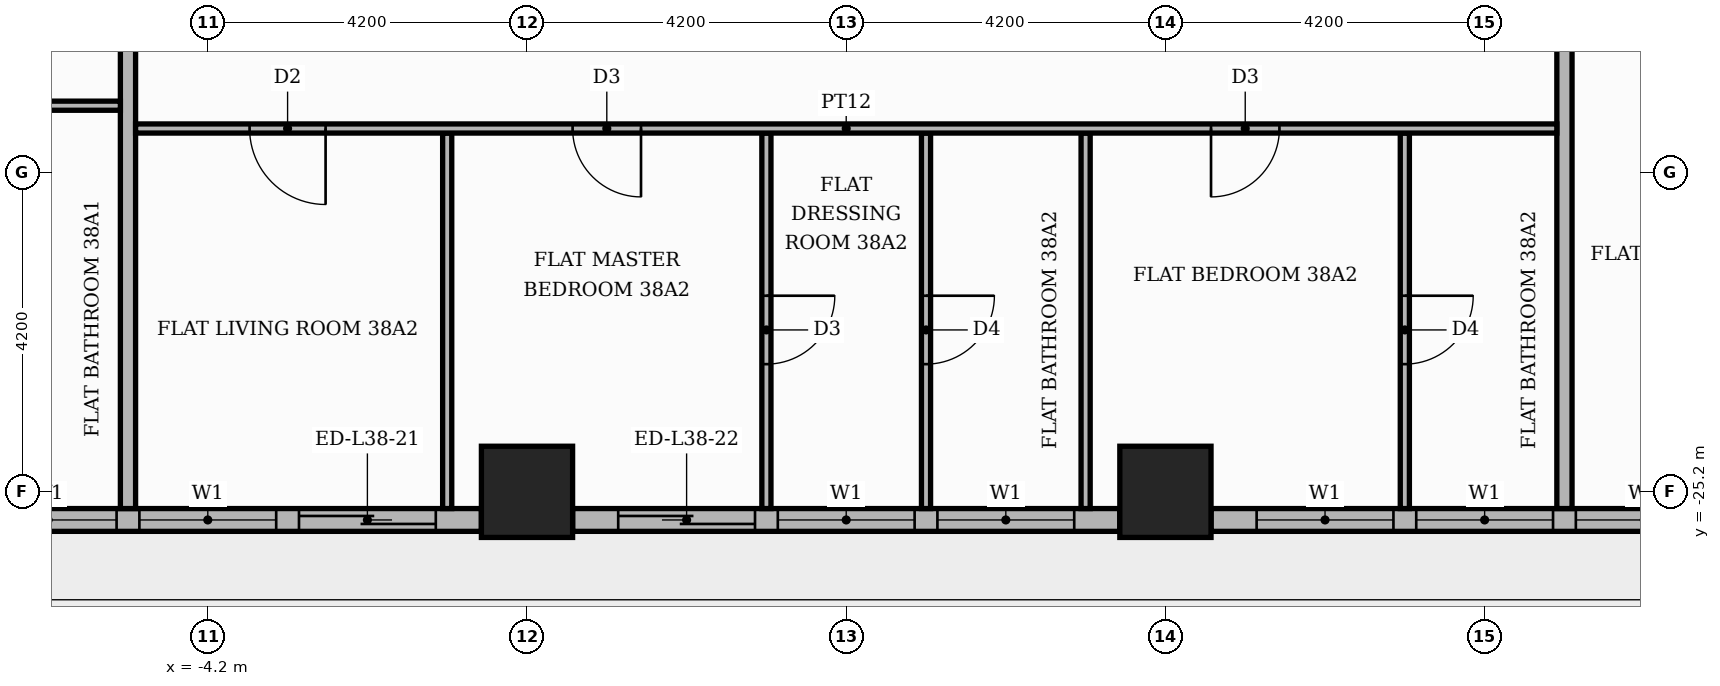
"""IFC4 building model, lengths in metres.
Left out: names, types, materials, properties, quantities, classifications, styles, units other than length and angle.
Written with IfcOpenShell. Run it as: python <this file> out.ifc"""

import sys

from ifc_helpers import new_model, si_unit, direction, frame, frame_2d, origin, origin_2d, place, context, subcontext, project, spatial, rectangle, extrude, element, fill, save


model = new_model("IFC4")
c1 = context("Model", 3, precision=1e-05, world=origin(), true_north=direction((0.0, 1.0)))
c2 = subcontext(c1, "Body", "Model", "MODEL_VIEW")
j1 = project(units=[si_unit("LENGTHUNIT", "METRE"), si_unit("PLANEANGLEUNIT", "RADIAN")], contexts=[c1])
p1 = place(None, origin())
s1 = spatial("IfcSite", under=j1, at=p1, CompositionType="ELEMENT")
p2 = place(p1, origin())
s2 = spatial("IfcBuilding", under=s1, at=p2, CompositionType="ELEMENT")
p3 = place(p2, frame((0.0, 0.0, 161.1)))
s3 = spatial("IfcBuildingStorey", under=s2, at=p3, CompositionType="ELEMENT", Elevation=161.1)
for number, where, z_axis, x_axis in (
    (1, (0.0, -25.2, 0.0), (0.0, 0.0, 1.0), (1.0, 0.0, 0.0)),
    (2, (8.4, -25.2, 0.0), (0.0, 0.0, 1.0), (1.0, 0.0, 0.0)),
):
    element("IfcColumn", number, at=place(p3, frame(where, z_axis=z_axis, x_axis=x_axis)), inside=s3, PredefinedType="COLUMN", context=c2, shape_type="SweptSolid", body=[
        extrude(rectangle(XDim=1.2, YDim=1.2, at=origin_2d()), origin(), (0.0, 0.0, 1.0), 3.9),
    ])
p4 = place(p3, frame((-7.8, -25.57, 0.0), z_axis=(0.0, 0.0, 1.0), x_axis=(1.0, 0.0, 0.0)))
e3 = element("IfcWall", 3, at=p4, inside=s3, PredefinedType="STANDARD", context=c2, shape_type="SweptSolid", body=[
    extrude(rectangle(XDim=7.2, YDim=0.3, at=frame_2d((3.6, 0.0))), origin(), (0.0, 0.0, 1.0), 3.48),
])
p5 = place(p4, frame((0.6, 0.0, 0.9)))
e4 = element("IfcOpeningElement", 4, at=p5, cuts=e3, PredefinedType="OPENING", context=c2, shape_type="SweptSolid", body=[
    extrude(rectangle(XDim=1.8, YDim=2.1, at=frame_2d((0.9, 1.05))), frame((0.0, 0.16, 0.0), z_axis=(0.0, -1.0, 0.0), x_axis=(1.0, 0.0, 0.0)), (0.0, 0.0, 1.0), 0.32),
])
p6 = place(p4, frame((2.7, 0.0, 0.9)))
e5 = element("IfcOpeningElement", 5, at=p6, cuts=e3, PredefinedType="OPENING", context=c2, shape_type="SweptSolid", body=[
    extrude(rectangle(XDim=1.8, YDim=2.1, at=frame_2d((0.9, 1.05))), frame((0.0, 0.16, 0.0), z_axis=(0.0, -1.0, 0.0), x_axis=(1.0, 0.0, 0.0)), (0.0, 0.0, 1.0), 0.32),
])
p7 = place(p4, frame((4.8, 0.0, 0.0)))
e6 = element("IfcOpeningElement", 6, at=p7, cuts=e3, PredefinedType="OPENING", context=c2, shape_type="SweptSolid", body=[
    extrude(rectangle(XDim=1.8, YDim=2.4, at=frame_2d((0.9, 1.2))), frame((0.0, 0.16, 0.0), z_axis=(0.0, -1.0, 0.0), x_axis=(1.0, 0.0, 0.0)), (0.0, 0.0, 1.0), 0.32),
])
p8 = place(p3, frame((0.6, -25.57, 0.0), z_axis=(0.0, 0.0, 1.0), x_axis=(1.0, 0.0, 0.0)))
e7 = element("IfcWall", 7, at=p8, inside=s3, PredefinedType="STANDARD", context=c2, shape_type="SweptSolid", body=[
    extrude(rectangle(XDim=7.2, YDim=0.3, at=frame_2d((3.6, 0.0))), origin(), (0.0, 0.0, 1.0), 3.48),
])
p9 = place(p8, frame((0.6, 0.0, 0.0)))
e8 = element("IfcOpeningElement", 8, at=p9, cuts=e7, PredefinedType="OPENING", context=c2, shape_type="SweptSolid", body=[
    extrude(rectangle(XDim=1.8, YDim=2.4, at=frame_2d((0.9, 1.2))), frame((0.0, 0.16, 0.0), z_axis=(0.0, -1.0, 0.0), x_axis=(1.0, 0.0, 0.0)), (0.0, 0.0, 1.0), 0.32),
])
p10 = place(p8, frame((2.7, 0.0, 0.9)))
e9 = element("IfcOpeningElement", 9, at=p10, cuts=e7, PredefinedType="OPENING", context=c2, shape_type="SweptSolid", body=[
    extrude(rectangle(XDim=1.8, YDim=2.1, at=frame_2d((0.9, 1.05))), frame((0.0, 0.16, 0.0), z_axis=(0.0, -1.0, 0.0), x_axis=(1.0, 0.0, 0.0)), (0.0, 0.0, 1.0), 0.32),
])
p11 = place(p8, frame((4.8, 0.0, 0.9)))
e10 = element("IfcOpeningElement", 10, at=p11, cuts=e7, PredefinedType="OPENING", context=c2, shape_type="SweptSolid", body=[
    extrude(rectangle(XDim=1.8, YDim=2.1, at=frame_2d((0.9, 1.05))), frame((0.0, 0.16, 0.0), z_axis=(0.0, -1.0, 0.0), x_axis=(1.0, 0.0, 0.0)), (0.0, 0.0, 1.0), 0.32),
])
p12 = place(p3, frame((9.0, -25.57, 0.0), z_axis=(0.0, 0.0, 1.0), x_axis=(1.0, 0.0, 0.0)))
e11 = element("IfcWall", 11, at=p12, inside=s3, PredefinedType="STANDARD", context=c2, shape_type="SweptSolid", body=[
    extrude(rectangle(XDim=7.2, YDim=0.3, at=frame_2d((3.6, 0.0))), origin(), (0.0, 0.0, 1.0), 3.48),
])
p13 = place(p12, frame((0.6, 0.0, 0.9)))
e12 = element("IfcOpeningElement", 12, at=p13, cuts=e11, PredefinedType="OPENING", context=c2, shape_type="SweptSolid", body=[
    extrude(rectangle(XDim=1.8, YDim=2.1, at=frame_2d((0.9, 1.05))), frame((0.0, 0.16, 0.0), z_axis=(0.0, -1.0, 0.0), x_axis=(1.0, 0.0, 0.0)), (0.0, 0.0, 1.0), 0.32),
])
p14 = place(p12, frame((2.7, 0.0, 0.9)))
e13 = element("IfcOpeningElement", 13, at=p14, cuts=e11, PredefinedType="OPENING", context=c2, shape_type="SweptSolid", body=[
    extrude(rectangle(XDim=1.8, YDim=2.1, at=frame_2d((0.9, 1.05))), frame((0.0, 0.16, 0.0), z_axis=(0.0, -1.0, 0.0), x_axis=(1.0, 0.0, 0.0)), (0.0, 0.0, 1.0), 0.32),
])
p15 = place(p12, frame((4.8, 0.0, 0.9)))
e14 = element("IfcOpeningElement", 14, at=p15, cuts=e11, PredefinedType="OPENING", context=c2, shape_type="SweptSolid", body=[
    extrude(rectangle(XDim=1.8, YDim=2.1, at=frame_2d((0.9, 1.05))), frame((0.0, 0.16, 0.0), z_axis=(0.0, -1.0, 0.0), x_axis=(1.0, 0.0, 0.0)), (0.0, 0.0, 1.0), 0.32),
])
p16 = place(p3, frame((-5.25, -25.42, 0.0), z_axis=(0.0, 0.0, 1.0), x_axis=(0.0, 1.0, 0.0)))
e15 = element("IfcWall", 15, at=p16, inside=s3, PredefinedType="PARTITIONING", context=c2, shape_type="SweptSolid", body=[
    extrude(rectangle(XDim=11.67, YDim=0.2, at=frame_2d((5.835, 0.0))), origin(), (0.0, 0.0, 1.0), 3.48),
])
p17 = place(p3, frame((-1.05, -25.42, 0.0), z_axis=(0.0, 0.0, 1.0), x_axis=(0.0, 1.0, 0.0)))
e16 = element("IfcWall", 16, at=p17, inside=s3, PredefinedType="PARTITIONING", context=c2, shape_type="SweptSolid", body=[
    extrude(rectangle(XDim=4.94, YDim=0.12, at=frame_2d((2.47, 0.0))), origin(), (0.0, 0.0, 1.0), 3.48),
])
p18 = place(p3, frame((3.15, -25.42, 0.0), z_axis=(0.0, 0.0, 1.0), x_axis=(0.0, 1.0, 0.0)))
e17 = element("IfcWall", 17, at=p18, inside=s3, PredefinedType="PARTITIONING", context=c2, shape_type="SweptSolid", body=[
    extrude(rectangle(XDim=4.94, YDim=0.12, at=frame_2d((2.47, 0.0))), origin(), (0.0, 0.0, 1.0), 3.48),
])
p19 = place(p18, frame((1.9, 0.0, 0.0)))
e18 = element("IfcOpeningElement", 18, at=p19, cuts=e17, PredefinedType="OPENING", context=c2, shape_type="SweptSolid", body=[
    extrude(rectangle(XDim=0.9, YDim=2.1, at=frame_2d((0.45, 1.05))), frame((0.0, 0.07, 0.0), z_axis=(0.0, -1.0, 0.0), x_axis=(1.0, 0.0, 0.0)), (0.0, 0.0, 1.0), 0.14),
])
p20 = place(p3, frame((5.25, -25.42, 0.0), z_axis=(0.0, 0.0, 1.0), x_axis=(0.0, 1.0, 0.0)))
e19 = element("IfcWall", 19, at=p20, inside=s3, PredefinedType="PARTITIONING", context=c2, shape_type="SweptSolid", body=[
    extrude(rectangle(XDim=4.94, YDim=0.12, at=frame_2d((2.47, 0.0))), origin(), (0.0, 0.0, 1.0), 3.48),
])
p21 = place(p20, frame((1.9, 0.0, 0.0)))
e20 = element("IfcOpeningElement", 20, at=p21, cuts=e19, PredefinedType="OPENING", context=c2, shape_type="SweptSolid", body=[
    extrude(rectangle(XDim=0.9, YDim=2.1, at=frame_2d((0.45, 1.05))), frame((0.0, 0.07, 0.0), z_axis=(0.0, -1.0, 0.0), x_axis=(1.0, 0.0, 0.0)), (0.0, 0.0, 1.0), 0.14),
])
p22 = place(p3, frame((7.35, -25.42, 0.0), z_axis=(0.0, 0.0, 1.0), x_axis=(0.0, 1.0, 0.0)))
e21 = element("IfcWall", 21, at=p22, inside=s3, PredefinedType="PARTITIONING", context=c2, shape_type="SweptSolid", body=[
    extrude(rectangle(XDim=4.94, YDim=0.12, at=frame_2d((2.47, 0.0))), origin(), (0.0, 0.0, 1.0), 3.48),
])
p23 = place(p3, frame((11.55, -25.42, 0.0), z_axis=(0.0, 0.0, 1.0), x_axis=(0.0, 1.0, 0.0)))
e22 = element("IfcWall", 22, at=p23, inside=s3, PredefinedType="PARTITIONING", context=c2, shape_type="SweptSolid", body=[
    extrude(rectangle(XDim=4.94, YDim=0.12, at=frame_2d((2.47, 0.0))), origin(), (0.0, 0.0, 1.0), 3.48),
])
p24 = place(p23, frame((1.9, 0.0, 0.0)))
e23 = element("IfcOpeningElement", 23, at=p24, cuts=e22, PredefinedType="OPENING", context=c2, shape_type="SweptSolid", body=[
    extrude(rectangle(XDim=0.9, YDim=2.1, at=frame_2d((0.45, 1.05))), frame((0.0, 0.07, 0.0), z_axis=(0.0, -1.0, 0.0), x_axis=(1.0, 0.0, 0.0)), (0.0, 0.0, 1.0), 0.14),
])
p25 = place(p3, frame((13.65, -25.42, 0.0), z_axis=(0.0, 0.0, 1.0), x_axis=(0.0, 1.0, 0.0)))
e24 = element("IfcWall", 24, at=p25, inside=s3, PredefinedType="PARTITIONING", context=c2, shape_type="SweptSolid", body=[
    extrude(rectangle(XDim=11.67, YDim=0.2, at=frame_2d((5.835, 0.0))), origin(), (0.0, 0.0, 1.0), 3.48),
])
p26 = place(p3, frame((-5.15, -20.42, 0.0), z_axis=(0.0, 0.0, 1.0), x_axis=(1.0, 0.0, 0.0)))
e25 = element("IfcWall", 25, at=p26, inside=s3, PredefinedType="PARTITIONING", context=c2, shape_type="SweptSolid", body=[
    extrude(rectangle(XDim=18.7, YDim=0.12, at=frame_2d((9.35, 0.0))), origin(), (0.0, 0.0, 1.0), 3.48),
])
p27 = place(p26, frame((1.5, 0.0, 0.0)))
e26 = element("IfcOpeningElement", 26, at=p27, cuts=e25, PredefinedType="OPENING", context=c2, shape_type="SweptSolid", body=[
    extrude(rectangle(XDim=1.0, YDim=2.1, at=frame_2d((0.5, 1.05))), frame((0.0, 0.07, 0.0), z_axis=(0.0, -1.0, 0.0), x_axis=(1.0, 0.0, 0.0)), (0.0, 0.0, 1.0), 0.14),
])
p28 = place(p26, frame((5.75, 0.0, 0.0)))
e27 = element("IfcOpeningElement", 27, at=p28, cuts=e25, PredefinedType="OPENING", context=c2, shape_type="SweptSolid", body=[
    extrude(rectangle(XDim=0.9, YDim=2.1, at=frame_2d((0.45, 1.05))), frame((0.0, 0.07, 0.0), z_axis=(0.0, -1.0, 0.0), x_axis=(1.0, 0.0, 0.0)), (0.0, 0.0, 1.0), 0.14),
])
p29 = place(p26, frame((14.15, 0.0, 0.0)))
e28 = element("IfcOpeningElement", 28, at=p29, cuts=e25, PredefinedType="OPENING", context=c2, shape_type="SweptSolid", body=[
    extrude(rectangle(XDim=0.9, YDim=2.1, at=frame_2d((0.45, 1.05))), frame((0.0, 0.07, 0.0), z_axis=(0.0, -1.0, 0.0), x_axis=(1.0, 0.0, 0.0)), (0.0, 0.0, 1.0), 0.14),
])
p30 = place(p3, frame((-25.42, -20.12, 0.0), z_axis=(0.0, 0.0, 1.0), x_axis=(1.0, 0.0, 0.0)))
e29 = element("IfcWall", 29, at=p30, inside=s3, PredefinedType="PARTITIONING", context=c2, shape_type="SweptSolid", body=[
    extrude(rectangle(XDim=20.07, YDim=0.12, at=frame_2d((10.035, 0.0))), origin(), (0.0, 0.0, 1.0), 3.48),
])
p31 = place(p30, frame((10.22, 0.0, 0.0)))
e30 = element("IfcOpeningElement", 30, at=p31, cuts=e29, PredefinedType="OPENING", context=c2, shape_type="SweptSolid", body=[
    extrude(rectangle(XDim=1.0, YDim=2.1, at=frame_2d((0.5, 1.05))), frame((0.0, 0.07, 0.0), z_axis=(0.0, -1.0, 0.0), x_axis=(1.0, 0.0, 0.0)), (0.0, 0.0, 1.0), 0.14),
])
p32 = place(p30, frame((13.42, 0.0, 0.0)))
e31 = element("IfcOpeningElement", 31, at=p32, cuts=e29, PredefinedType="OPENING", context=c2, shape_type="SweptSolid", body=[
    extrude(rectangle(XDim=0.9, YDim=2.1, at=frame_2d((0.45, 1.05))), frame((0.0, 0.07, 0.0), z_axis=(0.0, -1.0, 0.0), x_axis=(1.0, 0.0, 0.0)), (0.0, 0.0, 1.0), 0.14),
])
p33 = place(p5, origin())
e32 = element("IfcWindow", 32, at=p33, inside=s3, PartitioningType="SINGLE_PANEL", PredefinedType="WINDOW", context=c2, shape_type="SweptSolid", body=[
    extrude(rectangle(XDim=1.8, YDim=2.1, at=frame_2d((0.9, 1.05))), frame((0.0, 0.03, 0.0), z_axis=(0.0, -1.0, 0.0), x_axis=(1.0, 0.0, 0.0)), (0.0, 0.0, 1.0), 0.06),
])
fill(e4, e32)
p34 = place(p6, origin())
e33 = element("IfcWindow", 33, at=p34, inside=s3, PartitioningType="SINGLE_PANEL", PredefinedType="WINDOW", context=c2, shape_type="SweptSolid", body=[
    extrude(rectangle(XDim=1.8, YDim=2.1, at=frame_2d((0.9, 1.05))), frame((0.0, 0.03, 0.0), z_axis=(0.0, -1.0, 0.0), x_axis=(1.0, 0.0, 0.0)), (0.0, 0.0, 1.0), 0.06),
])
fill(e5, e33)
p35 = place(p7, origin())
e34 = element("IfcDoor", 34, at=p35, inside=s3, OperationType="SLIDING_TO_RIGHT", PredefinedType="DOOR", context=c2, shape_type="SweptSolid", body=[
    extrude(rectangle(XDim=1.8, YDim=2.4, at=frame_2d((0.9, 1.2))), frame((0.0, 0.025, 0.0), z_axis=(0.0, -1.0, 0.0), x_axis=(1.0, 0.0, 0.0)), (0.0, 0.0, 1.0), 0.05),
])
fill(e6, e34)
p36 = place(p9, origin())
e35 = element("IfcDoor", 35, at=p36, inside=s3, OperationType="SLIDING_TO_LEFT", PredefinedType="DOOR", context=c2, shape_type="SweptSolid", body=[
    extrude(rectangle(XDim=1.8, YDim=2.4, at=frame_2d((0.9, 1.2))), frame((0.0, 0.025, 0.0), z_axis=(0.0, -1.0, 0.0), x_axis=(1.0, 0.0, 0.0)), (0.0, 0.0, 1.0), 0.05),
])
fill(e8, e35)
p37 = place(p10, origin())
e36 = element("IfcWindow", 36, at=p37, inside=s3, PartitioningType="SINGLE_PANEL", PredefinedType="WINDOW", context=c2, shape_type="SweptSolid", body=[
    extrude(rectangle(XDim=1.8, YDim=2.1, at=frame_2d((0.9, 1.05))), frame((0.0, 0.03, 0.0), z_axis=(0.0, -1.0, 0.0), x_axis=(1.0, 0.0, 0.0)), (0.0, 0.0, 1.0), 0.06),
])
fill(e9, e36)
p38 = place(p11, origin())
e37 = element("IfcWindow", 37, at=p38, inside=s3, PartitioningType="SINGLE_PANEL", PredefinedType="WINDOW", context=c2, shape_type="SweptSolid", body=[
    extrude(rectangle(XDim=1.8, YDim=2.1, at=frame_2d((0.9, 1.05))), frame((0.0, 0.03, 0.0), z_axis=(0.0, -1.0, 0.0), x_axis=(1.0, 0.0, 0.0)), (0.0, 0.0, 1.0), 0.06),
])
fill(e10, e37)
p39 = place(p13, origin())
e38 = element("IfcWindow", 38, at=p39, inside=s3, PartitioningType="SINGLE_PANEL", PredefinedType="WINDOW", context=c2, shape_type="SweptSolid", body=[
    extrude(rectangle(XDim=1.8, YDim=2.1, at=frame_2d((0.9, 1.05))), frame((0.0, 0.03, 0.0), z_axis=(0.0, -1.0, 0.0), x_axis=(1.0, 0.0, 0.0)), (0.0, 0.0, 1.0), 0.06),
])
fill(e12, e38)
p40 = place(p14, origin())
e39 = element("IfcWindow", 39, at=p40, inside=s3, PartitioningType="SINGLE_PANEL", PredefinedType="WINDOW", context=c2, shape_type="SweptSolid", body=[
    extrude(rectangle(XDim=1.8, YDim=2.1, at=frame_2d((0.9, 1.05))), frame((0.0, 0.03, 0.0), z_axis=(0.0, -1.0, 0.0), x_axis=(1.0, 0.0, 0.0)), (0.0, 0.0, 1.0), 0.06),
])
fill(e13, e39)
p41 = place(p15, origin())
e40 = element("IfcWindow", 40, at=p41, inside=s3, PartitioningType="SINGLE_PANEL", PredefinedType="WINDOW", context=c2, shape_type="SweptSolid", body=[
    extrude(rectangle(XDim=1.8, YDim=2.1, at=frame_2d((0.9, 1.05))), frame((0.0, 0.03, 0.0), z_axis=(0.0, -1.0, 0.0), x_axis=(1.0, 0.0, 0.0)), (0.0, 0.0, 1.0), 0.06),
])
fill(e14, e40)
p42 = place(p27, frame((1.0, 0.0, 0.0), z_axis=(0.0, 0.0, 1.0), x_axis=(-1.0, 0.0, 0.0)))
e41 = element("IfcDoor", 41, at=p42, inside=s3, OperationType="SINGLE_SWING_RIGHT", PredefinedType="DOOR", context=c2, shape_type="SweptSolid", body=[
    extrude(rectangle(XDim=1.0, YDim=2.1, at=frame_2d((0.5, 1.05))), frame((0.0, 0.025, 0.0), z_axis=(0.0, -1.0, 0.0), x_axis=(1.0, 0.0, 0.0)), (0.0, 0.0, 1.0), 0.05),
])
fill(e26, e41)
p43 = place(p28, frame((0.9, 0.0, 0.0), z_axis=(0.0, 0.0, 1.0), x_axis=(-1.0, 0.0, 0.0)))
e42 = element("IfcDoor", 42, at=p43, inside=s3, OperationType="SINGLE_SWING_RIGHT", PredefinedType="DOOR", context=c2, shape_type="SweptSolid", body=[
    extrude(rectangle(XDim=0.9, YDim=2.1, at=frame_2d((0.45, 1.05))), frame((0.0, 0.025, 0.0), z_axis=(0.0, -1.0, 0.0), x_axis=(1.0, 0.0, 0.0)), (0.0, 0.0, 1.0), 0.05),
])
fill(e27, e42)
p44 = place(p19, frame((0.9, 0.0, 0.0), z_axis=(0.0, 0.0, 1.0), x_axis=(-1.0, 0.0, 0.0)))
e43 = element("IfcDoor", 43, at=p44, inside=s3, OperationType="SINGLE_SWING_RIGHT", PredefinedType="DOOR", context=c2, shape_type="SweptSolid", body=[
    extrude(rectangle(XDim=0.9, YDim=2.1, at=frame_2d((0.45, 1.05))), frame((0.0, 0.025, 0.0), z_axis=(0.0, -1.0, 0.0), x_axis=(1.0, 0.0, 0.0)), (0.0, 0.0, 1.0), 0.05),
])
fill(e18, e43)
p45 = place(p21, frame((0.9, 0.0, 0.0), z_axis=(0.0, 0.0, 1.0), x_axis=(-1.0, 0.0, 0.0)))
e44 = element("IfcDoor", 44, at=p45, inside=s3, OperationType="SINGLE_SWING_RIGHT", PredefinedType="DOOR", context=c2, shape_type="SweptSolid", body=[
    extrude(rectangle(XDim=0.9, YDim=2.1, at=frame_2d((0.45, 1.05))), frame((0.0, 0.025, 0.0), z_axis=(0.0, -1.0, 0.0), x_axis=(1.0, 0.0, 0.0)), (0.0, 0.0, 1.0), 0.05),
])
fill(e20, e44)
p46 = place(p29, frame((0.9, 0.0, 0.0), z_axis=(0.0, 0.0, 1.0), x_axis=(-1.0, 0.0, 0.0)))
e45 = element("IfcDoor", 45, at=p46, inside=s3, OperationType="SINGLE_SWING_LEFT", PredefinedType="DOOR", context=c2, shape_type="SweptSolid", body=[
    extrude(rectangle(XDim=0.9, YDim=2.1, at=frame_2d((0.45, 1.05))), frame((0.0, 0.025, 0.0), z_axis=(0.0, -1.0, 0.0), x_axis=(1.0, 0.0, 0.0)), (0.0, 0.0, 1.0), 0.05),
])
fill(e28, e45)
p47 = place(p24, frame((0.9, 0.0, 0.0), z_axis=(0.0, 0.0, 1.0), x_axis=(-1.0, 0.0, 0.0)))
e46 = element("IfcDoor", 46, at=p47, inside=s3, OperationType="SINGLE_SWING_RIGHT", PredefinedType="DOOR", context=c2, shape_type="SweptSolid", body=[
    extrude(rectangle(XDim=0.9, YDim=2.1, at=frame_2d((0.45, 1.05))), frame((0.0, 0.025, 0.0), z_axis=(0.0, -1.0, 0.0), x_axis=(1.0, 0.0, 0.0)), (0.0, 0.0, 1.0), 0.05),
])
fill(e23, e46)
save(model, sys.argv[1])
